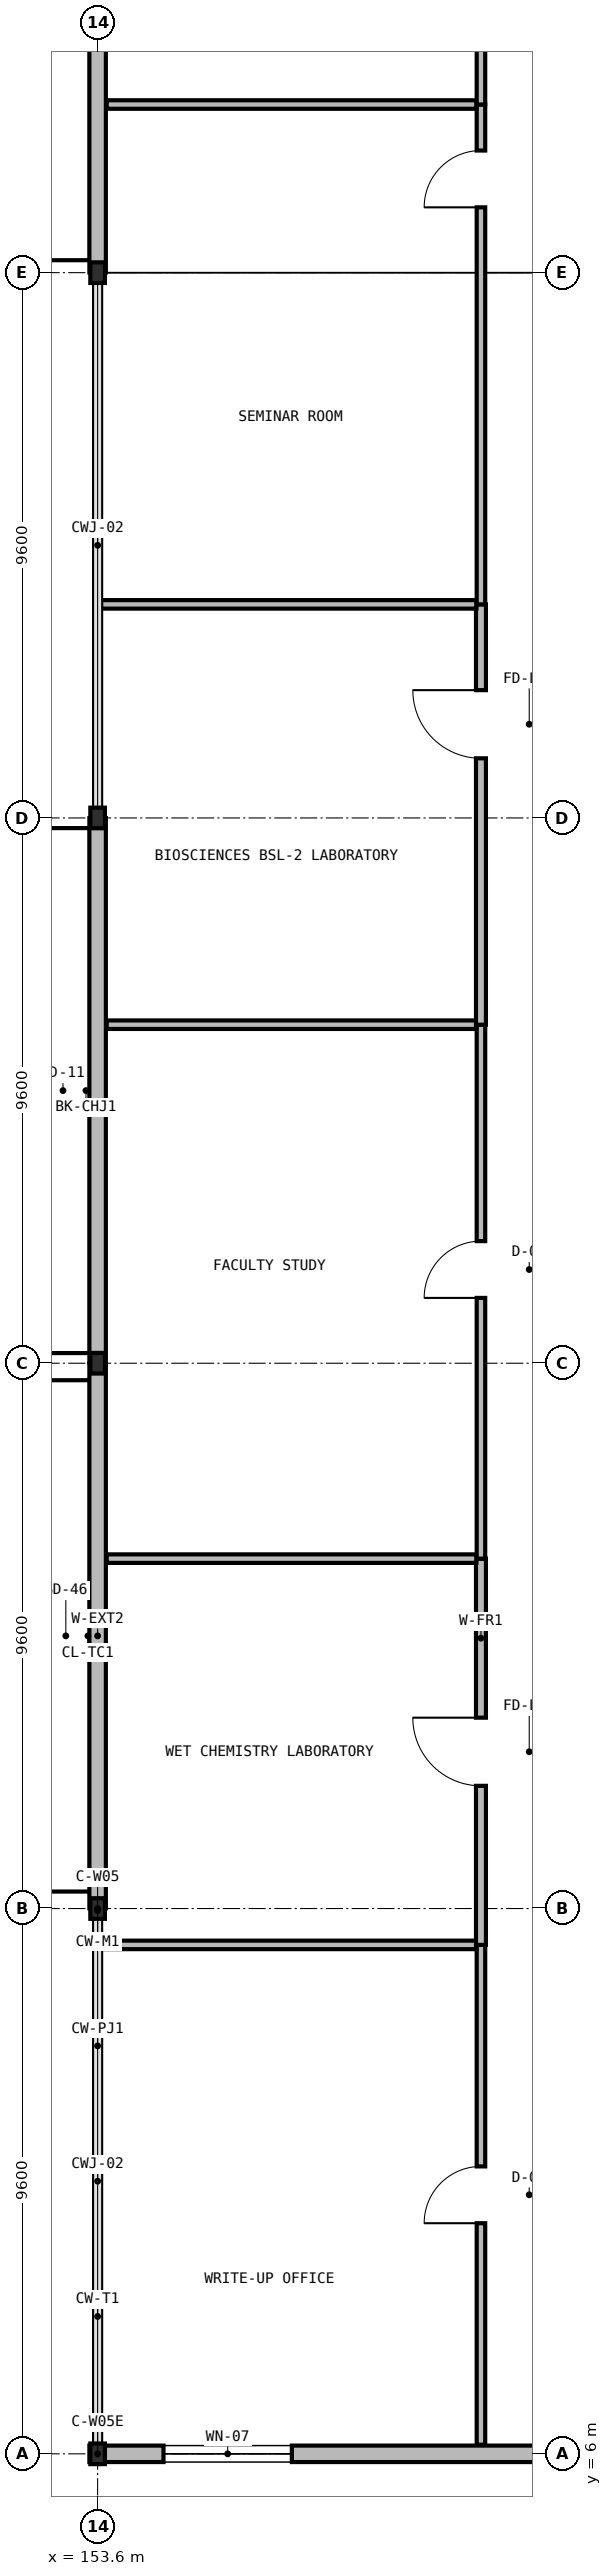
"""IFC4 building model, lengths in metres.
Left out: names, types, materials, properties, quantities, classifications, styles, units other than length and angle.
Written with IfcOpenShell. Run it as: python <this file> out.ifc"""

import sys

from ifc_helpers import new_model, si_unit, direction, frame, frame_2d, origin, origin_2d, place, context, subcontext, project, spatial, rectangle, i_section, extrude, element, fill, save


model = new_model("IFC4")
c1 = context("Model", 3, precision=1e-05, world=origin(), true_north=direction((0.0, 1.0)))
c2 = subcontext(c1, "Body", "Model", "MODEL_VIEW")
j1 = project(units=[si_unit("LENGTHUNIT", "METRE"), si_unit("PLANEANGLEUNIT", "RADIAN")], contexts=[c1])
p1 = place(None, origin())
s1 = spatial("IfcSite", under=j1, at=p1, CompositionType="ELEMENT")
p2 = place(p1, origin())
s2 = spatial("IfcBuilding", under=s1, at=p2, CompositionType="ELEMENT")
p3 = place(p2, frame((0.0, 0.0, 28.0)))
s3 = spatial("IfcBuildingStorey", under=s2, at=p3, CompositionType="ELEMENT", Elevation=28.0)
for number, where, z_axis, x_axis in (
    (1, (153.6, 6.0, 0.0), (0.0, 0.0, 1.0), (1.0, 0.0, 0.0)),
    (2, (153.6, 15.6, 0.0), (0.0, 0.0, 1.0), (1.0, 0.0, 0.0)),
    (3, (153.6, 25.2, 0.0), (0.0, 0.0, 1.0), (1.0, 0.0, 0.0)),
    (4, (153.6, 34.8, 0.0), (0.0, 0.0, 1.0), (1.0, 0.0, 0.0)),
    (5, (153.6, 44.4, 0.0), (0.0, 0.0, 1.0), (1.0, 0.0, 0.0)),
):
    element("IfcColumn", number, at=place(p3, frame(where, z_axis=z_axis, x_axis=x_axis)), inside=s3, PredefinedType="COLUMN", context=c2, shape_type="SweptSolid", body=[
        extrude(i_section(OverallWidth=0.257, OverallDepth=0.363, WebThickness=0.013, FlangeThickness=0.022, at=origin_2d()), origin(), (0.0, 0.0, 1.0), 4.55),
    ])
p4 = place(p3, frame((153.6, 15.604, 0.0), z_axis=(0.0, 0.0, 1.0), x_axis=(0.0, 1.0, 0.0)))
e6 = element("IfcWall", 6, at=p4, inside=s3, PredefinedType="SOLIDWALL", context=c2, shape_type="SweptSolid", body=[
    extrude(rectangle(XDim=9.592, YDim=0.29, at=frame_2d((4.796, 0.0))), origin(), (0.0, 0.0, 1.0), 3.908),
])
p5 = place(p3, frame((153.6, 25.204, 0.0), z_axis=(0.0, 0.0, 1.0), x_axis=(0.0, 1.0, 0.0)))
e7 = element("IfcWall", 7, at=p5, inside=s3, PredefinedType="SOLIDWALL", context=c2, shape_type="SweptSolid", body=[
    extrude(rectangle(XDim=9.592, YDim=0.29, at=frame_2d((4.796, 0.0))), origin(), (0.0, 0.0, 1.0), 3.908),
])
p6 = place(p3, frame((153.6, 44.404, 0.0), z_axis=(0.0, 0.0, 1.0), x_axis=(0.0, 1.0, 0.0)))
e8 = element("IfcWall", 8, at=p6, inside=s3, PredefinedType="SOLIDWALL", context=c2, shape_type="SweptSolid", body=[
    extrude(rectangle(XDim=13.192, YDim=0.29, at=frame_2d((6.596, 0.0))), origin(), (0.0, 0.0, 1.0), 3.757),
])
p7 = place(p6, frame((5.356, 0.0, 0.95)))
e9 = element("IfcOpeningElement", 9, at=p7, cuts=e8, PredefinedType="OPENING", context=c2, shape_type="SweptSolid", body=[
    extrude(rectangle(XDim=2.48, YDim=1.56, at=frame_2d((1.24, 0.78))), frame((0.0, 0.155, 0.0), z_axis=(0.0, -1.0, 0.0), x_axis=(1.0, 0.0, 0.0)), (0.0, 0.0, 1.0), 0.31),
])
p8 = place(p3, frame((163.196, 6.0, 0.0), z_axis=(0.0, 0.0, 1.0), x_axis=(-1.0, 0.0, 0.0)))
e10 = element("IfcWall", 10, at=p8, inside=s3, PredefinedType="SOLIDWALL", context=c2, shape_type="SweptSolid", body=[
    extrude(rectangle(XDim=9.741, YDim=0.29, at=frame_2d((4.871, 0.0))), origin(), (0.0, 0.0, 1.0), 3.899),
])
p9 = place(p8, frame((6.176, 0.0, 0.95)))
e11 = element("IfcOpeningElement", 11, at=p9, cuts=e10, PredefinedType="OPENING", context=c2, shape_type="SweptSolid", body=[
    extrude(rectangle(XDim=2.26, YDim=1.72, at=frame_2d((1.13, 0.86))), frame((0.0, 0.155, 0.0), z_axis=(0.0, -1.0, 0.0), x_axis=(1.0, 0.0, 0.0)), (0.0, 0.0, 1.0), 0.31),
])
p10 = place(p3, frame((160.35, 6.16, 0.0), z_axis=(0.0, 0.0, 1.0), x_axis=(0.0, 1.0, 0.0)))
e12 = element("IfcWall", 12, at=p10, inside=s3, PredefinedType="PARTITIONING", context=c2, shape_type="SweptSolid", body=[
    extrude(rectangle(XDim=8.8, YDim=0.15, at=frame_2d((4.4, 0.0))), origin(), (0.0, 0.0, 1.0), 4.3),
])
p11 = place(p10, frame((3.9, 0.0, 0.0)))
e13 = element("IfcOpeningElement", 13, at=p11, cuts=e12, PredefinedType="OPENING", context=c2, shape_type="SweptSolid", body=[
    extrude(rectangle(XDim=1.0, YDim=2.2, at=frame_2d((0.5, 1.1))), frame((0.0, 0.085, 0.0), z_axis=(0.0, -1.0, 0.0), x_axis=(1.0, 0.0, 0.0)), (0.0, 0.0, 1.0), 0.17),
])
p12 = place(p3, frame((153.66, 14.96, 0.0), z_axis=(0.0, 0.0, 1.0), x_axis=(1.0, 0.0, 0.0)))
e14 = element("IfcWall", 14, at=p12, inside=s3, PredefinedType="PARTITIONING", context=c2, shape_type="SweptSolid", body=[
    extrude(rectangle(XDim=6.61, YDim=0.15, at=frame_2d((3.305, 0.0))), origin(), (0.0, 0.0, 1.0), 4.3),
])
p13 = place(p3, frame((160.35, 14.96, 0.0), z_axis=(0.0, 0.0, 1.0), x_axis=(0.0, 1.0, 0.0)))
e15 = element("IfcWall", 15, at=p13, inside=s3, PredefinedType="PARTITIONING", context=c2, shape_type="SweptSolid", body=[
    extrude(rectangle(XDim=6.8, YDim=0.175, at=frame_2d((3.4, 0.0))), origin(), (0.0, 0.0, 1.0), 4.3),
])
p14 = place(p13, frame((2.8, 0.0, 0.0)))
e16 = element("IfcOpeningElement", 16, at=p14, cuts=e15, PredefinedType="OPENING", context=c2, shape_type="SweptSolid", body=[
    extrude(rectangle(XDim=1.2, YDim=2.2, at=frame_2d((0.6, 1.1))), frame((0.0, 0.097, 0.0), z_axis=(0.0, -1.0, 0.0), x_axis=(1.0, 0.0, 0.0)), (0.0, 0.0, 1.0), 0.195),
])
p15 = place(p3, frame((153.76, 21.76, 0.0), z_axis=(0.0, 0.0, 1.0), x_axis=(1.0, 0.0, 0.0)))
e17 = element("IfcWall", 17, at=p15, inside=s3, PredefinedType="PARTITIONING", context=c2, shape_type="SweptSolid", body=[
    extrude(rectangle(XDim=6.51, YDim=0.15, at=frame_2d((3.255, 0.0))), origin(), (0.0, 0.0, 1.0), 4.3),
])
p16 = place(p3, frame((160.35, 21.76, 0.0), z_axis=(0.0, 0.0, 1.0), x_axis=(0.0, 1.0, 0.0)))
e18 = element("IfcWall", 18, at=p16, inside=s3, PredefinedType="PARTITIONING", context=c2, shape_type="SweptSolid", body=[
    extrude(rectangle(XDim=9.4, YDim=0.15, at=frame_2d((4.7, 0.0))), origin(), (0.0, 0.0, 1.0), 4.3),
])
p17 = place(p16, frame((4.59, 0.0, 0.0)))
e19 = element("IfcOpeningElement", 19, at=p17, cuts=e18, PredefinedType="OPENING", context=c2, shape_type="SweptSolid", body=[
    extrude(rectangle(XDim=1.0, YDim=2.2, at=frame_2d((0.5, 1.1))), frame((0.0, 0.085, 0.0), z_axis=(0.0, -1.0, 0.0), x_axis=(1.0, 0.0, 0.0)), (0.0, 0.0, 1.0), 0.17),
])
p18 = place(p3, frame((153.76, 31.16, 0.0), z_axis=(0.0, 0.0, 1.0), x_axis=(1.0, 0.0, 0.0)))
e20 = element("IfcWall", 20, at=p18, inside=s3, PredefinedType="PARTITIONING", context=c2, shape_type="SweptSolid", body=[
    extrude(rectangle(XDim=6.51, YDim=0.15, at=frame_2d((3.255, 0.0))), origin(), (0.0, 0.0, 1.0), 4.3),
])
p19 = place(p3, frame((160.35, 31.16, 0.0), z_axis=(0.0, 0.0, 1.0), x_axis=(0.0, 1.0, 0.0)))
e21 = element("IfcWall", 21, at=p19, inside=s3, PredefinedType="PARTITIONING", context=c2, shape_type="SweptSolid", body=[
    extrude(rectangle(XDim=7.4, YDim=0.175, at=frame_2d((3.7, 0.0))), origin(), (0.0, 0.0, 1.0), 4.3),
])
p20 = place(p19, frame((4.69, 0.0, 0.0)))
e22 = element("IfcOpeningElement", 22, at=p20, cuts=e21, PredefinedType="OPENING", context=c2, shape_type="SweptSolid", body=[
    extrude(rectangle(XDim=1.2, YDim=2.2, at=frame_2d((0.6, 1.1))), frame((0.0, 0.097, 0.0), z_axis=(0.0, -1.0, 0.0), x_axis=(1.0, 0.0, 0.0)), (0.0, 0.0, 1.0), 0.195),
])
p21 = place(p3, frame((153.66, 38.56, 0.0), z_axis=(0.0, 0.0, 1.0), x_axis=(1.0, 0.0, 0.0)))
e23 = element("IfcWall", 23, at=p21, inside=s3, PredefinedType="PARTITIONING", context=c2, shape_type="SweptSolid", body=[
    extrude(rectangle(XDim=6.61, YDim=0.15, at=frame_2d((3.305, 0.0))), origin(), (0.0, 0.0, 1.0), 4.3),
])
p22 = place(p3, frame((160.35, 38.56, 0.0), z_axis=(0.0, 0.0, 1.0), x_axis=(0.0, 1.0, 0.0)))
e24 = element("IfcWall", 24, at=p22, inside=s3, PredefinedType="PARTITIONING", context=c2, shape_type="SweptSolid", body=[
    extrude(rectangle(XDim=8.8, YDim=0.15, at=frame_2d((4.4, 0.0))), origin(), (0.0, 0.0, 1.0), 4.3),
])
p23 = place(p22, frame((6.99, 0.0, 0.0)))
e25 = element("IfcOpeningElement", 25, at=p23, cuts=e24, PredefinedType="OPENING", context=c2, shape_type="SweptSolid", body=[
    extrude(rectangle(XDim=1.0, YDim=2.2, at=frame_2d((0.5, 1.1))), frame((0.0, 0.085, 0.0), z_axis=(0.0, -1.0, 0.0), x_axis=(1.0, 0.0, 0.0)), (0.0, 0.0, 1.0), 0.17),
])
p24 = place(p3, frame((153.76, 47.36, 0.0), z_axis=(0.0, 0.0, 1.0), x_axis=(1.0, 0.0, 0.0)))
e26 = element("IfcWall", 26, at=p24, inside=s3, PredefinedType="PARTITIONING", context=c2, shape_type="SweptSolid", body=[
    extrude(rectangle(XDim=6.51, YDim=0.15, at=frame_2d((3.255, 0.0))), origin(), (0.0, 0.0, 1.0), 4.3),
])
p25 = place(p3, frame((160.35, 47.36, 0.0), z_axis=(0.0, 0.0, 1.0), x_axis=(0.0, 1.0, 0.0)))
e27 = element("IfcWall", 27, at=p25, inside=s3, PredefinedType="PARTITIONING", context=c2, shape_type="SweptSolid", body=[
    extrude(rectangle(XDim=6.8, YDim=0.15, at=frame_2d((3.4, 0.0))), origin(), (0.0, 0.0, 1.0), 4.3),
])
p26 = place(p25, frame((2.9, 0.0, 0.0)))
e28 = element("IfcOpeningElement", 28, at=p26, cuts=e27, PredefinedType="OPENING", context=c2, shape_type="SweptSolid", body=[
    extrude(rectangle(XDim=1.0, YDim=2.2, at=frame_2d((0.5, 1.1))), frame((0.0, 0.085, 0.0), z_axis=(0.0, -1.0, 0.0), x_axis=(1.0, 0.0, 0.0)), (0.0, 0.0, 1.0), 0.17),
])
p27 = place(p9, origin())
e29 = element("IfcWindow", 29, at=p27, inside=s3, PartitioningType="SINGLE_PANEL", PredefinedType="WINDOW", context=c2, shape_type="SweptSolid", body=[
    extrude(rectangle(XDim=2.26, YDim=1.72, at=frame_2d((1.13, 0.86))), frame((0.0, 0.03, 0.0), z_axis=(0.0, -1.0, 0.0), x_axis=(1.0, 0.0, 0.0)), (0.0, 0.0, 1.0), 0.06),
])
fill(e11, e29)
p28 = place(p11, origin())
e30 = element("IfcDoor", 30, at=p28, inside=s3, OperationType="SINGLE_SWING_LEFT", PredefinedType="DOOR", context=c2, shape_type="SweptSolid", body=[
    extrude(rectangle(XDim=1.0, YDim=2.2, at=frame_2d((0.5, 1.1))), frame((0.0, 0.025, 0.0), z_axis=(0.0, -1.0, 0.0), x_axis=(1.0, 0.0, 0.0)), (0.0, 0.0, 1.0), 0.05),
])
fill(e13, e30)
p29 = place(p14, origin())
e31 = element("IfcDoor", 31, at=p29, inside=s3, OperationType="SINGLE_SWING_RIGHT", PredefinedType="DOOR", context=c2, shape_type="SweptSolid", body=[
    extrude(rectangle(XDim=1.2, YDim=2.2, at=frame_2d((0.6, 1.1))), frame((0.0, 0.025, 0.0), z_axis=(0.0, -1.0, 0.0), x_axis=(1.0, 0.0, 0.0)), (0.0, 0.0, 1.0), 0.05),
])
fill(e16, e31)
p30 = place(p17, origin())
e32 = element("IfcDoor", 32, at=p30, inside=s3, OperationType="SINGLE_SWING_LEFT", PredefinedType="DOOR", context=c2, shape_type="SweptSolid", body=[
    extrude(rectangle(XDim=1.0, YDim=2.2, at=frame_2d((0.5, 1.1))), frame((0.0, 0.025, 0.0), z_axis=(0.0, -1.0, 0.0), x_axis=(1.0, 0.0, 0.0)), (0.0, 0.0, 1.0), 0.05),
])
fill(e19, e32)
p31 = place(p20, origin())
e33 = element("IfcDoor", 33, at=p31, inside=s3, OperationType="SINGLE_SWING_RIGHT", PredefinedType="DOOR", context=c2, shape_type="SweptSolid", body=[
    extrude(rectangle(XDim=1.2, YDim=2.2, at=frame_2d((0.6, 1.1))), frame((0.0, 0.025, 0.0), z_axis=(0.0, -1.0, 0.0), x_axis=(1.0, 0.0, 0.0)), (0.0, 0.0, 1.0), 0.05),
])
fill(e22, e33)
p32 = place(p23, origin())
e34 = element("IfcDoor", 34, at=p32, inside=s3, OperationType="SINGLE_SWING_LEFT", PredefinedType="DOOR", context=c2, shape_type="SweptSolid", body=[
    extrude(rectangle(XDim=1.0, YDim=2.2, at=frame_2d((0.5, 1.1))), frame((0.0, 0.025, 0.0), z_axis=(0.0, -1.0, 0.0), x_axis=(1.0, 0.0, 0.0)), (0.0, 0.0, 1.0), 0.05),
])
fill(e25, e34)
save(model, sys.argv[1])
